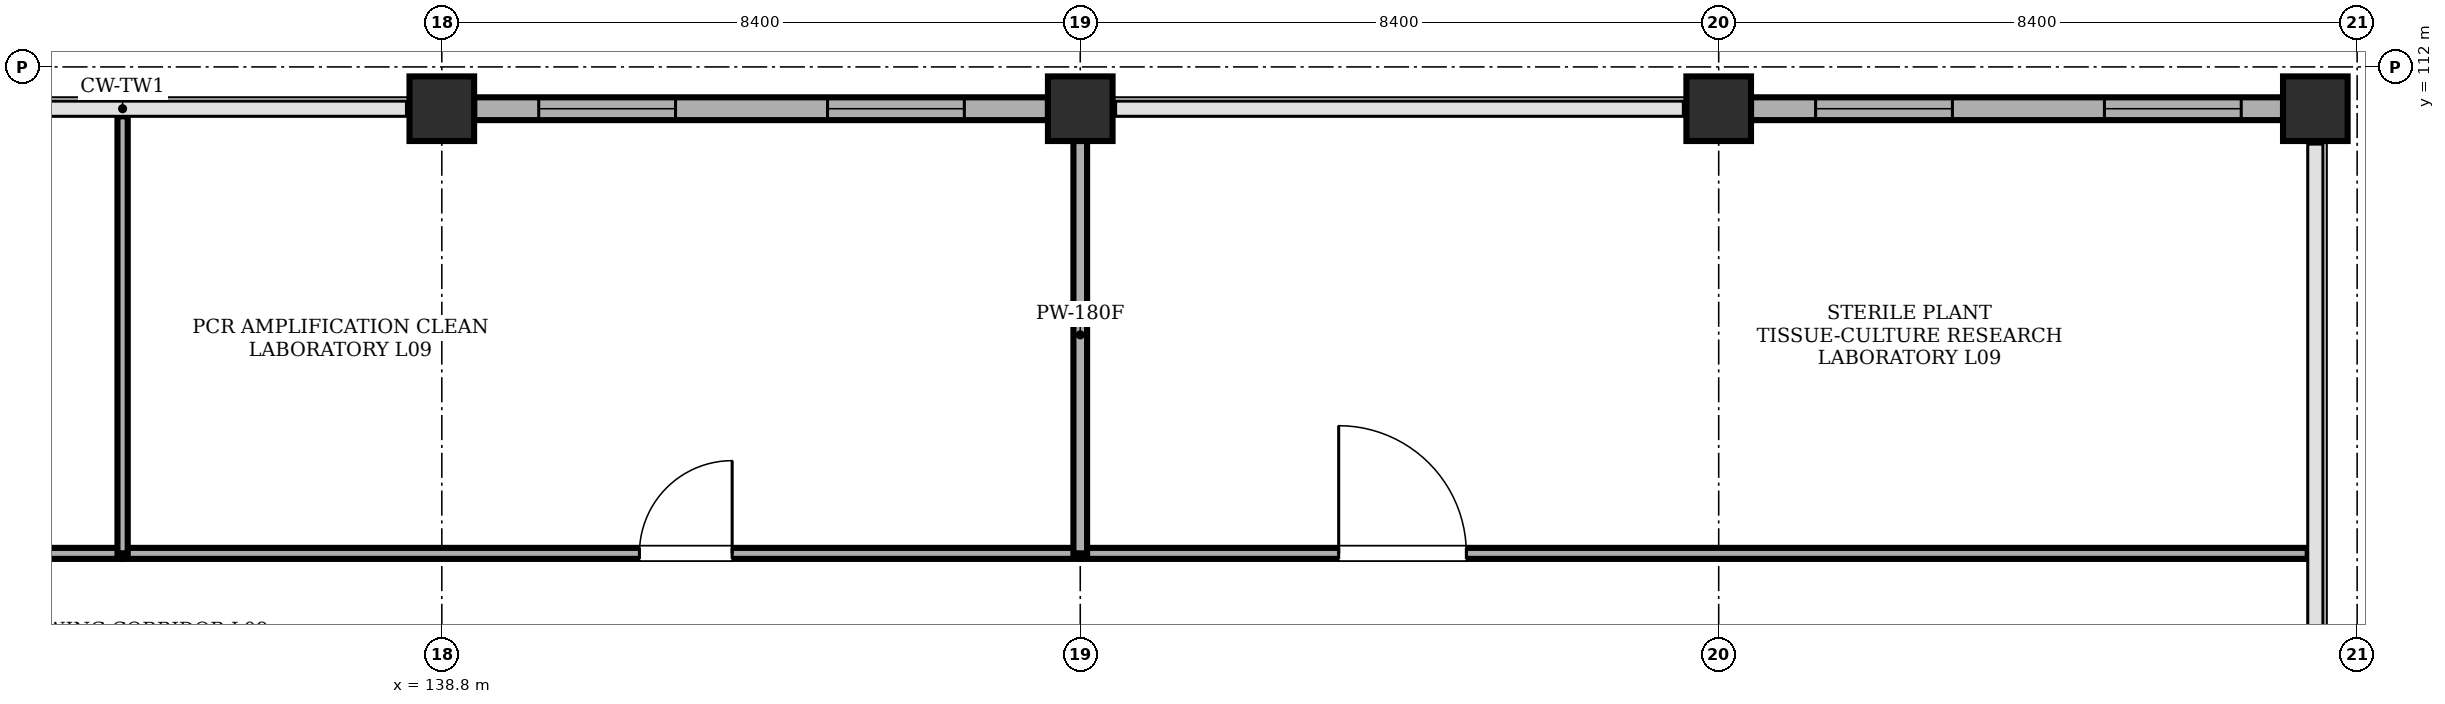
"""IFC4 building model, lengths in metres.
Left out: names, types, materials, properties, quantities, classifications, styles, units other than length and angle.
Written with IfcOpenShell. Run it as: python <this file> out.ifc"""

import sys

from ifc_helpers import new_model, si_unit, direction, frame, frame_2d, origin, origin_2d, place, context, subcontext, project, spatial, rectangle, extrude, element, fill, save


model = new_model("IFC4")
c1 = context("Model", 3, precision=1e-05, world=origin(), true_north=direction((0.0, 1.0)))
c2 = subcontext(c1, "Body", "Model", "MODEL_VIEW")
j1 = project(units=[si_unit("LENGTHUNIT", "METRE"), si_unit("PLANEANGLEUNIT", "RADIAN")], contexts=[c1])
p1 = place(None, origin())
s1 = spatial("IfcSite", under=j1, at=p1, CompositionType="ELEMENT")
p2 = place(p1, origin())
s2 = spatial("IfcBuilding", under=s1, at=p2, CompositionType="ELEMENT")
p3 = place(p2, frame((0.0, 0.0, 36.0)))
s3 = spatial("IfcBuildingStorey", under=s2, at=p3, CompositionType="ELEMENT", Elevation=36.0)
for number, where, z_axis, x_axis in (
    (1, (138.8, 111.45, 0.0), (0.0, 0.0, 1.0), (1.0, 0.0, 0.0)),
    (2, (147.2, 111.45, 0.0), (0.0, 0.0, 1.0), (1.0, 0.0, 0.0)),
    (3, (155.6, 111.45, 0.0), (0.0, 0.0, 1.0), (1.0, 0.0, 0.0)),
    (4, (163.45, 111.45, 0.0), (0.0, 0.0, 1.0), (1.0, 0.0, 0.0)),
):
    element("IfcColumn", number, at=place(p3, frame(where, z_axis=z_axis, x_axis=x_axis)), inside=s3, PredefinedType="COLUMN", context=c2, shape_type="SweptSolid", body=[
        extrude(rectangle(XDim=0.85, YDim=0.85, at=origin_2d()), origin(), (0.0, 0.0, 1.0), 4.02),
    ])
p4 = place(p3, frame((139.225, 111.45, 0.0), z_axis=(0.0, 0.0, 1.0), x_axis=(1.0, 0.0, 0.0)))
e5 = element("IfcWall", 5, at=p4, inside=s3, PredefinedType="STANDARD", context=c2, shape_type="SweptSolid", body=[
    extrude(rectangle(XDim=7.55, YDim=0.3, at=frame_2d((3.775, 0.0))), origin(), (0.0, 0.0, 1.0), 3.32),
])
p5 = place(p4, frame((0.85, 0.0, 0.9)))
e6 = element("IfcOpeningElement", 6, at=p5, cuts=e5, PredefinedType="OPENING", context=c2, shape_type="SweptSolid", body=[
    extrude(rectangle(XDim=1.8, YDim=2.1, at=frame_2d((0.9, 1.05))), frame((0.0, 0.16, 0.0), z_axis=(0.0, -1.0, 0.0), x_axis=(1.0, 0.0, 0.0)), (0.0, 0.0, 1.0), 0.32),
])
p6 = place(p4, frame((4.65, 0.0, 0.9)))
e7 = element("IfcOpeningElement", 7, at=p6, cuts=e5, PredefinedType="OPENING", context=c2, shape_type="SweptSolid", body=[
    extrude(rectangle(XDim=1.8, YDim=2.1, at=frame_2d((0.9, 1.05))), frame((0.0, 0.16, 0.0), z_axis=(0.0, -1.0, 0.0), x_axis=(1.0, 0.0, 0.0)), (0.0, 0.0, 1.0), 0.32),
])
p7 = place(p3, frame((156.025, 111.45, 0.0), z_axis=(0.0, 0.0, 1.0), x_axis=(1.0, 0.0, 0.0)))
e8 = element("IfcWall", 8, at=p7, inside=s3, PredefinedType="STANDARD", context=c2, shape_type="SweptSolid", body=[
    extrude(rectangle(XDim=7.0, YDim=0.3, at=frame_2d((3.5, 0.0))), origin(), (0.0, 0.0, 1.0), 3.32),
])
p8 = place(p7, frame((0.85, 0.0, 0.9)))
e9 = element("IfcOpeningElement", 9, at=p8, cuts=e8, PredefinedType="OPENING", context=c2, shape_type="SweptSolid", body=[
    extrude(rectangle(XDim=1.8, YDim=2.1, at=frame_2d((0.9, 1.05))), frame((0.0, 0.16, 0.0), z_axis=(0.0, -1.0, 0.0), x_axis=(1.0, 0.0, 0.0)), (0.0, 0.0, 1.0), 0.32),
])
p9 = place(p7, frame((4.65, 0.0, 0.9)))
e10 = element("IfcOpeningElement", 10, at=p9, cuts=e8, PredefinedType="OPENING", context=c2, shape_type="SweptSolid", body=[
    extrude(rectangle(XDim=1.8, YDim=2.1, at=frame_2d((0.9, 1.05))), frame((0.0, 0.16, 0.0), z_axis=(0.0, -1.0, 0.0), x_axis=(1.0, 0.0, 0.0)), (0.0, 0.0, 1.0), 0.32),
])
p10 = place(p3, frame((122.15, 105.6, 0.0), z_axis=(0.0, 0.0, 1.0), x_axis=(1.0, 0.0, 0.0)))
e11 = element("IfcWall", 11, at=p10, inside=s3, PredefinedType="PARTITIONING", context=c2, shape_type="SweptSolid", body=[
    extrude(rectangle(XDim=12.45, YDim=0.145, at=frame_2d((6.225, 0.0))), origin(), (0.0, 0.0, 1.0), 4.02),
])
p11 = place(p10, frame((3.75, 0.0, 0.0)))
e12 = element("IfcOpeningElement", 12, at=p11, cuts=e11, PredefinedType="OPENING", context=c2, shape_type="SweptSolid", body=[
    extrude(rectangle(XDim=1.68, YDim=2.24, at=frame_2d((0.84, 1.12))), frame((0.0, 0.083, 0.0), z_axis=(0.0, -1.0, 0.0), x_axis=(1.0, 0.0, 0.0)), (0.0, 0.0, 1.0), 0.165),
])
p12 = place(p3, frame((134.6, 105.6, 0.0), z_axis=(0.0, 0.0, 1.0), x_axis=(1.0, 0.0, 0.0)))
e13 = element("IfcWall", 13, at=p12, inside=s3, PredefinedType="PARTITIONING", context=c2, shape_type="SweptSolid", body=[
    extrude(rectangle(XDim=12.6, YDim=0.145, at=frame_2d((6.3, 0.0))), origin(), (0.0, 0.0, 1.0), 4.02),
])
p13 = place(p12, frame((6.8, 0.0, 0.0)))
e14 = element("IfcOpeningElement", 14, at=p13, cuts=e13, PredefinedType="OPENING", context=c2, shape_type="SweptSolid", body=[
    extrude(rectangle(XDim=1.22, YDim=2.2, at=frame_2d((0.61, 1.1))), frame((0.0, 0.083, 0.0), z_axis=(0.0, -1.0, 0.0), x_axis=(1.0, 0.0, 0.0)), (0.0, 0.0, 1.0), 0.165),
])
p14 = place(p3, frame((134.6, 105.6, 0.0), z_axis=(0.0, 0.0, 1.0), x_axis=(0.0, 1.0, 0.0)))
e15 = element("IfcWall", 15, at=p14, inside=s3, PredefinedType="PARTITIONING", context=c2, shape_type="SweptSolid", body=[
    extrude(rectangle(XDim=5.75, YDim=0.135, at=frame_2d((2.875, 0.0))), origin(), (0.0, 0.0, 1.0), 3.52),
])
p15 = place(p3, frame((147.2, 105.6, 0.0), z_axis=(0.0, 0.0, 1.0), x_axis=(1.0, 0.0, 0.0)))
e16 = element("IfcWall", 16, at=p15, inside=s3, PredefinedType="PARTITIONING", context=c2, shape_type="SweptSolid", body=[
    extrude(rectangle(XDim=16.15, YDim=0.145, at=frame_2d((8.075, 0.0))), origin(), (0.0, 0.0, 1.0), 4.02),
])
p16 = place(p15, frame((3.4, 0.0, 0.0)))
e17 = element("IfcOpeningElement", 17, at=p16, cuts=e16, PredefinedType="OPENING", context=c2, shape_type="SweptSolid", body=[
    extrude(rectangle(XDim=1.68, YDim=2.24, at=frame_2d((0.84, 1.12))), frame((0.0, 0.083, 0.0), z_axis=(0.0, -1.0, 0.0), x_axis=(1.0, 0.0, 0.0)), (0.0, 0.0, 1.0), 0.165),
])
p17 = place(p3, frame((147.2, 105.6, 0.0), z_axis=(0.0, 0.0, 1.0), x_axis=(0.0, 1.0, 0.0)))
e18 = element("IfcWall", 18, at=p17, inside=s3, PredefinedType="STANDARD", context=c2, shape_type="SweptSolid", body=[
    extrude(rectangle(XDim=5.75, YDim=0.18, at=frame_2d((2.875, 0.0))), origin(), (0.0, 0.0, 1.0), 3.32),
])
p18 = place(p5, origin())
e19 = element("IfcWindow", 19, at=p18, inside=s3, PartitioningType="DOUBLE_PANEL_VERTICAL", PredefinedType="WINDOW", context=c2, shape_type="SweptSolid", body=[
    extrude(rectangle(XDim=1.8, YDim=2.1, at=frame_2d((0.9, 1.05))), frame((0.0, 0.03, 0.0), z_axis=(0.0, -1.0, 0.0), x_axis=(1.0, 0.0, 0.0)), (0.0, 0.0, 1.0), 0.06),
])
fill(e6, e19)
p19 = place(p6, origin())
e20 = element("IfcWindow", 20, at=p19, inside=s3, PartitioningType="DOUBLE_PANEL_VERTICAL", PredefinedType="WINDOW", context=c2, shape_type="SweptSolid", body=[
    extrude(rectangle(XDim=1.8, YDim=2.1, at=frame_2d((0.9, 1.05))), frame((0.0, 0.03, 0.0), z_axis=(0.0, -1.0, 0.0), x_axis=(1.0, 0.0, 0.0)), (0.0, 0.0, 1.0), 0.06),
])
fill(e7, e20)
p20 = place(p8, origin())
e21 = element("IfcWindow", 21, at=p20, inside=s3, PartitioningType="DOUBLE_PANEL_VERTICAL", PredefinedType="WINDOW", context=c2, shape_type="SweptSolid", body=[
    extrude(rectangle(XDim=1.8, YDim=2.1, at=frame_2d((0.9, 1.05))), frame((0.0, 0.03, 0.0), z_axis=(0.0, -1.0, 0.0), x_axis=(1.0, 0.0, 0.0)), (0.0, 0.0, 1.0), 0.06),
])
fill(e9, e21)
p21 = place(p9, origin())
e22 = element("IfcWindow", 22, at=p21, inside=s3, PartitioningType="DOUBLE_PANEL_VERTICAL", PredefinedType="WINDOW", context=c2, shape_type="SweptSolid", body=[
    extrude(rectangle(XDim=1.8, YDim=2.1, at=frame_2d((0.9, 1.05))), frame((0.0, 0.03, 0.0), z_axis=(0.0, -1.0, 0.0), x_axis=(1.0, 0.0, 0.0)), (0.0, 0.0, 1.0), 0.06),
])
fill(e10, e22)
p22 = place(p13, origin())
e23 = element("IfcDoor", 23, at=p22, inside=s3, OperationType="SINGLE_SWING_RIGHT", PredefinedType="DOOR", context=c2, shape_type="SweptSolid", body=[
    extrude(rectangle(XDim=1.22, YDim=2.2, at=frame_2d((0.61, 1.1))), frame((0.0, 0.025, 0.0), z_axis=(0.0, -1.0, 0.0), x_axis=(1.0, 0.0, 0.0)), (0.0, 0.0, 1.0), 0.05),
])
fill(e14, e23)
p23 = place(p16, origin())
e24 = element("IfcDoor", 24, at=p23, inside=s3, OperationType="SINGLE_SWING_LEFT", PredefinedType="DOOR", context=c2, shape_type="SweptSolid", body=[
    extrude(rectangle(XDim=1.68, YDim=2.24, at=frame_2d((0.84, 1.12))), frame((0.0, 0.025, 0.0), z_axis=(0.0, -1.0, 0.0), x_axis=(1.0, 0.0, 0.0)), (0.0, 0.0, 1.0), 0.05),
])
fill(e17, e24)
save(model, sys.argv[1])
